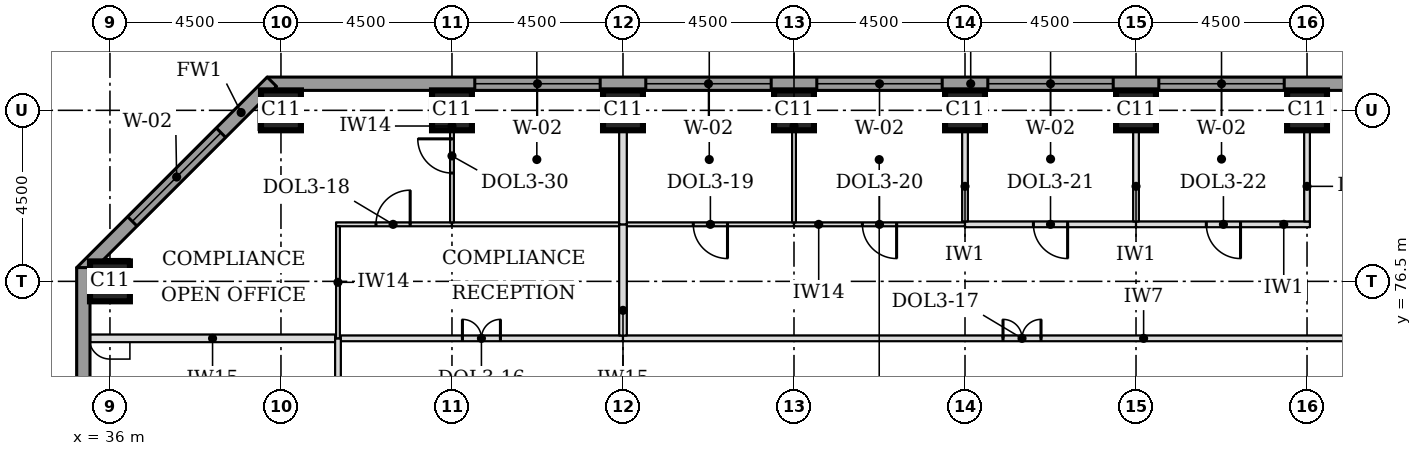
"""IFC4 building model, lengths in metres.
Left out: names, types, materials, properties, quantities, classifications, styles, units other than length and angle.
Written with IfcOpenShell. Run it as: python <this file> out.ifc"""

import sys

from ifc_helpers import new_model, si_unit, direction, frame, frame_2d, origin, origin_2d, place, context, subcontext, project, spatial, rectangle, extrude, element, fill, save


model = new_model("IFC4")
c1 = context("Model", 3, precision=1e-05, world=origin(), true_north=direction((0.0, 1.0)))
c2 = subcontext(c1, "Body", "Model", "MODEL_VIEW")
j1 = project(units=[si_unit("LENGTHUNIT", "METRE"), si_unit("PLANEANGLEUNIT", "RADIAN")], contexts=[c1])
p1 = place(None, origin())
s1 = spatial("IfcSite", under=j1, at=p1, CompositionType="ELEMENT")
p2 = place(p1, origin())
s2 = spatial("IfcBuilding", under=s1, at=p2, CompositionType="ELEMENT")
p3 = place(p2, frame((0.0, 0.0, 93.7)))
s3 = spatial("IfcBuildingStorey", under=s2, at=p3, CompositionType="ELEMENT", Elevation=93.7)
for number, where, z_axis, x_axis in (
    (1, (36.0, 76.5, 0.0), (0.0, 0.0, 1.0), (1.0, 0.0, 0.0)),
    (2, (40.5, 81.0, 0.0), (0.0, 0.0, 1.0), (1.0, 0.0, 0.0)),
    (3, (45.0, 81.0, 0.0), (0.0, 0.0, 1.0), (1.0, 0.0, 0.0)),
    (4, (49.5, 81.0, 0.0), (0.0, 0.0, 1.0), (1.0, 0.0, 0.0)),
    (5, (54.0, 81.0, 0.0), (0.0, 0.0, 1.0), (1.0, 0.0, 0.0)),
    (6, (58.5, 81.0, 0.0), (0.0, 0.0, 1.0), (1.0, 0.0, 0.0)),
    (7, (63.0, 81.0, 0.0), (0.0, 0.0, 1.0), (1.0, 0.0, 0.0)),
    (8, (67.5, 81.0, 0.0), (0.0, 0.0, 1.0), (1.0, 0.0, 0.0)),
):
    element("IfcColumn", number, at=place(p3, frame(where, z_axis=z_axis, x_axis=x_axis)), inside=s3, PredefinedType="COLUMN", context=c2, shape_type="SweptSolid", body=[
        extrude(rectangle(XDim=1.05, YDim=1.05, at=origin_2d()), origin(), (0.0, 0.0, 1.0), 3.7),
    ])
p4 = place(p3, frame((72.362, 81.7, 0.0), z_axis=(0.0, 0.0, 1.0), x_axis=(-1.0, 0.0, 0.0)))
e9 = element("IfcWall", 9, at=p4, inside=s3, PredefinedType="STANDARD", context=c2, shape_type="SweptSolid", body=[
    extrude(rectangle(XDim=32.225, YDim=0.35, at=frame_2d((16.112, 0.0))), origin(), (0.0, 0.0, 1.0), 3.525),
])
p5 = place(p4, frame((5.462, 0.0, 0.9)))
e10 = element("IfcOpeningElement", 10, at=p5, cuts=e9, PredefinedType="OPENING", context=c2, shape_type="SweptSolid", body=[
    extrude(rectangle(XDim=3.3, YDim=1.9, at=frame_2d((1.65, 0.95))), frame((0.0, 0.185, 0.0), z_axis=(0.0, -1.0, 0.0), x_axis=(1.0, 0.0, 0.0)), (0.0, 0.0, 1.0), 0.37),
])
p6 = place(p4, frame((9.962, 0.0, 0.9)))
e11 = element("IfcOpeningElement", 11, at=p6, cuts=e9, PredefinedType="OPENING", context=c2, shape_type="SweptSolid", body=[
    extrude(rectangle(XDim=3.3, YDim=1.9, at=frame_2d((1.65, 0.95))), frame((0.0, 0.185, 0.0), z_axis=(0.0, -1.0, 0.0), x_axis=(1.0, 0.0, 0.0)), (0.0, 0.0, 1.0), 0.37),
])
p7 = place(p4, frame((14.462, 0.0, 0.9)))
e12 = element("IfcOpeningElement", 12, at=p7, cuts=e9, PredefinedType="OPENING", context=c2, shape_type="SweptSolid", body=[
    extrude(rectangle(XDim=3.3, YDim=1.9, at=frame_2d((1.65, 0.95))), frame((0.0, 0.185, 0.0), z_axis=(0.0, -1.0, 0.0), x_axis=(1.0, 0.0, 0.0)), (0.0, 0.0, 1.0), 0.37),
])
p8 = place(p4, frame((18.962, 0.0, 0.9)))
e13 = element("IfcOpeningElement", 13, at=p8, cuts=e9, PredefinedType="OPENING", context=c2, shape_type="SweptSolid", body=[
    extrude(rectangle(XDim=3.3, YDim=1.9, at=frame_2d((1.65, 0.95))), frame((0.0, 0.185, 0.0), z_axis=(0.0, -1.0, 0.0), x_axis=(1.0, 0.0, 0.0)), (0.0, 0.0, 1.0), 0.37),
])
p9 = place(p4, frame((23.462, 0.0, 0.9)))
e14 = element("IfcOpeningElement", 14, at=p9, cuts=e9, PredefinedType="OPENING", context=c2, shape_type="SweptSolid", body=[
    extrude(rectangle(XDim=3.3, YDim=1.9, at=frame_2d((1.65, 0.95))), frame((0.0, 0.185, 0.0), z_axis=(0.0, -1.0, 0.0), x_axis=(1.0, 0.0, 0.0)), (0.0, 0.0, 1.0), 0.37),
])
p10 = place(p3, frame((40.261, 81.751, 0.0), z_axis=(0.0, 0.0, 1.0), x_axis=(-0.707106781187, -0.707106781187, 0.0)))
e15 = element("IfcWall", 15, at=p10, inside=s3, PredefinedType="STANDARD", context=c2, shape_type="SweptSolid", body=[
    extrude(rectangle(XDim=7.089, YDim=0.35, at=frame_2d((3.544, 0.0))), origin(), (0.0, 0.0, 1.0), 3.525),
])
p11 = place(p10, frame((1.894, 0.0, 0.9)))
e16 = element("IfcOpeningElement", 16, at=p11, cuts=e15, PredefinedType="OPENING", context=c2, shape_type="SweptSolid", body=[
    extrude(rectangle(XDim=3.3, YDim=1.9, at=frame_2d((1.65, 0.95))), frame((0.0, 0.185, 0.0), z_axis=(0.0, -1.0, 0.0), x_axis=(1.0, 0.0, 0.0)), (0.0, 0.0, 1.0), 0.37),
])
p12 = place(p3, frame((35.3, 76.862, 0.0), z_axis=(0.0, 0.0, 1.0), x_axis=(0.0, -1.0, 0.0)))
e17 = element("IfcWall", 17, at=p12, inside=s3, PredefinedType="STANDARD", context=c2, shape_type="SweptSolid", body=[
    extrude(rectangle(XDim=13.337, YDim=0.35, at=frame_2d((6.669, 0.0))), origin(), (0.0, 0.0, 1.0), 3.525),
])
p13 = place(p12, frame((9.537, 0.0, 0.9)))
e18 = element("IfcOpeningElement", 18, at=p13, cuts=e17, PredefinedType="OPENING", context=c2, shape_type="SweptSolid", body=[
    extrude(rectangle(XDim=3.3, YDim=1.9, at=frame_2d((1.65, 0.95))), frame((0.0, 0.185, 0.0), z_axis=(0.0, -1.0, 0.0), x_axis=(1.0, 0.0, 0.0)), (0.0, 0.0, 1.0), 0.37),
])
p14 = place(p3, frame((35.475, 75.0, 0.0), z_axis=(0.0, 0.0, 1.0), x_axis=(1.0, 0.0, 0.0)))
e19 = element("IfcWall", 19, at=p14, inside=s3, PredefinedType="PARTITIONING", context=c2, shape_type="SweptSolid", body=[
    extrude(rectangle(XDim=6.45, YDim=0.2, at=frame_2d((3.225, 0.0))), origin(), (0.0, 0.0, 1.0), 3.55),
])
p15 = place(p3, frame((42.075, 75.0, 0.0), z_axis=(0.0, 0.0, 1.0), x_axis=(1.0, 0.0, 0.0)))
e20 = element("IfcWall", 20, at=p15, inside=s3, PredefinedType="PARTITIONING", context=c2, shape_type="SweptSolid", body=[
    extrude(rectangle(XDim=7.425, YDim=0.15, at=frame_2d((3.712, 0.0))), origin(), (0.0, 0.0, 1.0), 3.55),
])
p16 = place(p15, frame((3.2, 0.0, 0.0)))
e21 = element("IfcOpeningElement", 21, at=p16, cuts=e20, PredefinedType="OPENING", context=c2, shape_type="SweptSolid", body=[
    extrude(rectangle(XDim=1.0, YDim=2.1, at=frame_2d((0.5, 1.05))), frame((0.0, 0.085, 0.0), z_axis=(0.0, -1.0, 0.0), x_axis=(1.0, 0.0, 0.0)), (0.0, 0.0, 1.0), 0.17),
])
p17 = place(p3, frame((49.5, 75.0, 0.0), z_axis=(0.0, 0.0, 1.0), x_axis=(1.0, 0.0, 0.0)))
e22 = element("IfcWall", 22, at=p17, inside=s3, PredefinedType="PARTITIONING", context=c2, shape_type="SweptSolid", body=[
    extrude(rectangle(XDim=21.0, YDim=0.15, at=frame_2d((10.5, 0.0))), origin(), (0.0, 0.0, 1.0), 3.55),
])
p18 = place(p17, frame((10.0, 0.0, 0.0)))
e23 = element("IfcOpeningElement", 23, at=p18, cuts=e22, PredefinedType="OPENING", context=c2, shape_type="SweptSolid", body=[
    extrude(rectangle(XDim=1.0, YDim=2.1, at=frame_2d((0.5, 1.05))), frame((0.0, 0.085, 0.0), z_axis=(0.0, -1.0, 0.0), x_axis=(1.0, 0.0, 0.0)), (0.0, 0.0, 1.0), 0.17),
])
p19 = place(p3, frame((41.95, 78.0, 0.0), z_axis=(0.0, 0.0, 1.0), x_axis=(1.0, 0.0, 0.0)))
e24 = element("IfcWall", 24, at=p19, inside=s3, PredefinedType="PARTITIONING", context=c2, shape_type="SweptSolid", body=[
    extrude(rectangle(XDim=3.05, YDim=0.1, at=frame_2d((1.525, 0.0))), origin(), (0.0, 0.0, 1.0), 3.55),
])
p20 = place(p19, frame((1.05, 0.0, 0.0)))
e25 = element("IfcOpeningElement", 25, at=p20, cuts=e24, PredefinedType="OPENING", context=c2, shape_type="SweptSolid", body=[
    extrude(rectangle(XDim=0.9, YDim=2.1, at=frame_2d((0.45, 1.05))), frame((0.0, 0.06, 0.0), z_axis=(0.0, -1.0, 0.0), x_axis=(1.0, 0.0, 0.0)), (0.0, 0.0, 1.0), 0.12),
])
p21 = place(p3, frame((45.0, 78.0, 0.0), z_axis=(0.0, 0.0, 1.0), x_axis=(1.0, 0.0, 0.0)))
e26 = element("IfcWall", 26, at=p21, inside=s3, PredefinedType="PARTITIONING", context=c2, shape_type="SweptSolid", body=[
    extrude(rectangle(XDim=4.4, YDim=0.1, at=frame_2d((2.2, 0.0))), origin(), (0.0, 0.0, 1.0), 3.55),
])
p22 = place(p3, frame((49.6, 78.0, 0.0), z_axis=(0.0, 0.0, 1.0), x_axis=(1.0, 0.0, 0.0)))
e27 = element("IfcWall", 27, at=p22, inside=s3, PredefinedType="PARTITIONING", context=c2, shape_type="SweptSolid", body=[
    extrude(rectangle(XDim=4.4, YDim=0.1, at=frame_2d((2.2, 0.0))), origin(), (0.0, 0.0, 1.0), 3.55),
])
p23 = place(p22, frame((1.75, 0.0, 0.0)))
e28 = element("IfcOpeningElement", 28, at=p23, cuts=e27, PredefinedType="OPENING", context=c2, shape_type="SweptSolid", body=[
    extrude(rectangle(XDim=0.9, YDim=2.1, at=frame_2d((0.45, 1.05))), frame((0.0, 0.06, 0.0), z_axis=(0.0, -1.0, 0.0), x_axis=(1.0, 0.0, 0.0)), (0.0, 0.0, 1.0), 0.12),
])
p24 = place(p3, frame((54.0, 78.0, 0.0), z_axis=(0.0, 0.0, 1.0), x_axis=(1.0, 0.0, 0.0)))
e29 = element("IfcWall", 29, at=p24, inside=s3, PredefinedType="PARTITIONING", context=c2, shape_type="SweptSolid", body=[
    extrude(rectangle(XDim=4.5, YDim=0.1, at=frame_2d((2.25, 0.0))), origin(), (0.0, 0.0, 1.0), 3.55),
])
p25 = place(p24, frame((1.8, 0.0, 0.0)))
e30 = element("IfcOpeningElement", 30, at=p25, cuts=e29, PredefinedType="OPENING", context=c2, shape_type="SweptSolid", body=[
    extrude(rectangle(XDim=0.9, YDim=2.1, at=frame_2d((0.45, 1.05))), frame((0.0, 0.06, 0.0), z_axis=(0.0, -1.0, 0.0), x_axis=(1.0, 0.0, 0.0)), (0.0, 0.0, 1.0), 0.12),
])
p26 = place(p3, frame((58.5, 78.0, 0.0), z_axis=(0.0, 0.0, 1.0), x_axis=(1.0, 0.0, 0.0)))
e31 = element("IfcWall", 31, at=p26, inside=s3, PredefinedType="PARTITIONING", context=c2, shape_type="SweptSolid", body=[
    extrude(rectangle(XDim=4.5, YDim=0.15, at=frame_2d((2.25, 0.0))), origin(), (0.0, 0.0, 1.0), 3.55),
])
p27 = place(p26, frame((1.8, 0.0, 0.0)))
e32 = element("IfcOpeningElement", 32, at=p27, cuts=e31, PredefinedType="OPENING", context=c2, shape_type="SweptSolid", body=[
    extrude(rectangle(XDim=0.9, YDim=2.1, at=frame_2d((0.45, 1.05))), frame((0.0, 0.085, 0.0), z_axis=(0.0, -1.0, 0.0), x_axis=(1.0, 0.0, 0.0)), (0.0, 0.0, 1.0), 0.17),
])
p28 = place(p3, frame((63.0, 78.0, 0.0), z_axis=(0.0, 0.0, 1.0), x_axis=(1.0, 0.0, 0.0)))
e33 = element("IfcWall", 33, at=p28, inside=s3, PredefinedType="PARTITIONING", context=c2, shape_type="SweptSolid", body=[
    extrude(rectangle(XDim=4.575, YDim=0.15, at=frame_2d((2.288, 0.0))), origin(), (0.0, 0.0, 1.0), 3.55),
])
p29 = place(p28, frame((1.85, 0.0, 0.0)))
e34 = element("IfcOpeningElement", 34, at=p29, cuts=e33, PredefinedType="OPENING", context=c2, shape_type="SweptSolid", body=[
    extrude(rectangle(XDim=0.9, YDim=2.1, at=frame_2d((0.45, 1.05))), frame((0.0, 0.085, 0.0), z_axis=(0.0, -1.0, 0.0), x_axis=(1.0, 0.0, 0.0)), (0.0, 0.0, 1.0), 0.17),
])
p30 = place(p3, frame((42.0, 57.075, 0.0), z_axis=(0.0, 0.0, 1.0), x_axis=(0.0, 1.0, 0.0)))
e35 = element("IfcWall", 35, at=p30, inside=s3, PredefinedType="PARTITIONING", context=c2, shape_type="SweptSolid", body=[
    extrude(rectangle(XDim=17.925, YDim=0.15, at=frame_2d((8.962, 0.0))), origin(), (0.0, 0.0, 1.0), 3.55),
])
p31 = place(p3, frame((42.0, 75.0, 0.0), z_axis=(0.0, 0.0, 1.0), x_axis=(0.0, 1.0, 0.0)))
e36 = element("IfcWall", 36, at=p31, inside=s3, PredefinedType="PARTITIONING", context=c2, shape_type="SweptSolid", body=[
    extrude(rectangle(XDim=2.95, YDim=0.1, at=frame_2d((1.475, 0.0))), origin(), (0.0, 0.0, 1.0), 3.55),
])
p32 = place(p3, frame((49.5, 75.075, 0.0), z_axis=(0.0, 0.0, 1.0), x_axis=(0.0, 1.0, 0.0)))
e37 = element("IfcWall", 37, at=p32, inside=s3, PredefinedType="PARTITIONING", context=c2, shape_type="SweptSolid", body=[
    extrude(rectangle(XDim=2.925, YDim=0.2, at=frame_2d((1.462, 0.0))), origin(), (0.0, 0.0, 1.0), 3.55),
])
p33 = place(p3, frame((49.5, 78.0, 0.0), z_axis=(0.0, 0.0, 1.0), x_axis=(0.0, 1.0, 0.0)))
e38 = element("IfcWall", 38, at=p33, inside=s3, PredefinedType="PARTITIONING", context=c2, shape_type="SweptSolid", body=[
    extrude(rectangle(XDim=3.525, YDim=0.2, at=frame_2d((1.762, 0.0))), origin(), (0.0, 0.0, 1.0), 3.55),
])
p34 = place(p3, frame((45.0, 78.05, 0.0), z_axis=(0.0, 0.0, 1.0), x_axis=(0.0, 1.0, 0.0)))
e39 = element("IfcWall", 39, at=p34, inside=s3, PredefinedType="PARTITIONING", context=c2, shape_type="SweptSolid", body=[
    extrude(rectangle(XDim=3.475, YDim=0.1, at=frame_2d((1.737, 0.0))), origin(), (0.0, 0.0, 1.0), 3.55),
])
p35 = place(p34, frame((1.3, 0.0, 0.0)))
e40 = element("IfcOpeningElement", 40, at=p35, cuts=e39, PredefinedType="OPENING", context=c2, shape_type="SweptSolid", body=[
    extrude(rectangle(XDim=0.9, YDim=2.1, at=frame_2d((0.45, 1.05))), frame((0.0, 0.06, 0.0), z_axis=(0.0, -1.0, 0.0), x_axis=(1.0, 0.0, 0.0)), (0.0, 0.0, 1.0), 0.12),
])
p36 = place(p3, frame((54.0, 78.05, 0.0), z_axis=(0.0, 0.0, 1.0), x_axis=(0.0, 1.0, 0.0)))
e41 = element("IfcWall", 41, at=p36, inside=s3, PredefinedType="PARTITIONING", context=c2, shape_type="SweptSolid", body=[
    extrude(rectangle(XDim=3.475, YDim=0.1, at=frame_2d((1.737, 0.0))), origin(), (0.0, 0.0, 1.0), 3.55),
])
for number, where, z_axis, x_axis in (
    (42, (58.5, 78.075, 0.0), (0.0, 0.0, 1.0), (0.0, 1.0, 0.0)),
    (43, (63.0, 78.075, 0.0), (0.0, 0.0, 1.0), (0.0, 1.0, 0.0)),
    (44, (67.5, 78.075, 0.0), (0.0, 0.0, 1.0), (0.0, 1.0, 0.0)),
):
    element("IfcWall", number, at=place(p3, frame(where, z_axis=z_axis, x_axis=x_axis)), inside=s3, PredefinedType="PARTITIONING", context=c2, shape_type="SweptSolid", body=[
        extrude(rectangle(XDim=3.45, YDim=0.15, at=frame_2d((1.725, 0.0))), origin(), (0.0, 0.0, 1.0), 3.55),
    ])
p37 = place(p5, origin())
e45 = element("IfcWindow", 45, at=p37, inside=s3, PartitioningType="SINGLE_PANEL", PredefinedType="WINDOW", context=c2, shape_type="SweptSolid", body=[
    extrude(rectangle(XDim=3.3, YDim=1.9, at=frame_2d((1.65, 0.95))), frame((0.0, 0.085, 0.0), z_axis=(0.0, -1.0, 0.0), x_axis=(1.0, 0.0, 0.0)), (0.0, 0.0, 1.0), 0.06),
])
fill(e10, e45)
p38 = place(p6, origin())
e46 = element("IfcWindow", 46, at=p38, inside=s3, PartitioningType="SINGLE_PANEL", PredefinedType="WINDOW", context=c2, shape_type="SweptSolid", body=[
    extrude(rectangle(XDim=3.3, YDim=1.9, at=frame_2d((1.65, 0.95))), frame((0.0, 0.085, 0.0), z_axis=(0.0, -1.0, 0.0), x_axis=(1.0, 0.0, 0.0)), (0.0, 0.0, 1.0), 0.06),
])
fill(e11, e46)
p39 = place(p7, origin())
e47 = element("IfcWindow", 47, at=p39, inside=s3, PartitioningType="SINGLE_PANEL", PredefinedType="WINDOW", context=c2, shape_type="SweptSolid", body=[
    extrude(rectangle(XDim=3.3, YDim=1.9, at=frame_2d((1.65, 0.95))), frame((0.0, 0.085, 0.0), z_axis=(0.0, -1.0, 0.0), x_axis=(1.0, 0.0, 0.0)), (0.0, 0.0, 1.0), 0.06),
])
fill(e12, e47)
p40 = place(p8, origin())
e48 = element("IfcWindow", 48, at=p40, inside=s3, PartitioningType="SINGLE_PANEL", PredefinedType="WINDOW", context=c2, shape_type="SweptSolid", body=[
    extrude(rectangle(XDim=3.3, YDim=1.9, at=frame_2d((1.65, 0.95))), frame((0.0, 0.085, 0.0), z_axis=(0.0, -1.0, 0.0), x_axis=(1.0, 0.0, 0.0)), (0.0, 0.0, 1.0), 0.06),
])
fill(e13, e48)
p41 = place(p9, origin())
e49 = element("IfcWindow", 49, at=p41, inside=s3, PartitioningType="SINGLE_PANEL", PredefinedType="WINDOW", context=c2, shape_type="SweptSolid", body=[
    extrude(rectangle(XDim=3.3, YDim=1.9, at=frame_2d((1.65, 0.95))), frame((0.0, 0.085, 0.0), z_axis=(0.0, -1.0, 0.0), x_axis=(1.0, 0.0, 0.0)), (0.0, 0.0, 1.0), 0.06),
])
fill(e14, e49)
p42 = place(p11, origin())
e50 = element("IfcWindow", 50, at=p42, inside=s3, PartitioningType="SINGLE_PANEL", PredefinedType="WINDOW", context=c2, shape_type="SweptSolid", body=[
    extrude(rectangle(XDim=3.3, YDim=1.9, at=frame_2d((1.65, 0.95))), frame((0.0, 0.085, 0.0), z_axis=(0.0, -1.0, 0.0), x_axis=(1.0, 0.0, 0.0)), (0.0, 0.0, 1.0), 0.06),
])
fill(e16, e50)
p43 = place(p16, origin())
e51 = element("IfcDoor", 51, at=p43, inside=s3, OperationType="DOUBLE_DOOR_SINGLE_SWING", PredefinedType="DOOR", context=c2, shape_type="SweptSolid", body=[
    extrude(rectangle(XDim=1.0, YDim=2.1, at=frame_2d((0.5, 1.05))), frame((0.0, 0.025, 0.0), z_axis=(0.0, -1.0, 0.0), x_axis=(1.0, 0.0, 0.0)), (0.0, 0.0, 1.0), 0.05),
])
fill(e21, e51)
p44 = place(p20, origin())
e52 = element("IfcDoor", 52, at=p44, inside=s3, OperationType="SINGLE_SWING_RIGHT", PredefinedType="DOOR", context=c2, shape_type="SweptSolid", body=[
    extrude(rectangle(XDim=0.9, YDim=2.1, at=frame_2d((0.45, 1.05))), frame((0.0, 0.025, 0.0), z_axis=(0.0, -1.0, 0.0), x_axis=(1.0, 0.0, 0.0)), (0.0, 0.0, 1.0), 0.05),
])
fill(e25, e52)
p45 = place(p35, origin())
e53 = element("IfcDoor", 53, at=p45, inside=s3, OperationType="SINGLE_SWING_RIGHT", PredefinedType="DOOR", context=c2, shape_type="SweptSolid", body=[
    extrude(rectangle(XDim=0.9, YDim=2.1, at=frame_2d((0.45, 1.05))), frame((0.0, 0.025, 0.0), z_axis=(0.0, -1.0, 0.0), x_axis=(1.0, 0.0, 0.0)), (0.0, 0.0, 1.0), 0.05),
])
fill(e40, e53)
p46 = place(p18, origin())
e54 = element("IfcDoor", 54, at=p46, inside=s3, OperationType="DOUBLE_DOOR_SINGLE_SWING", PredefinedType="DOOR", context=c2, shape_type="SweptSolid", body=[
    extrude(rectangle(XDim=1.0, YDim=2.1, at=frame_2d((0.5, 1.05))), frame((0.0, 0.025, 0.0), z_axis=(0.0, -1.0, 0.0), x_axis=(1.0, 0.0, 0.0)), (0.0, 0.0, 1.0), 0.05),
])
fill(e23, e54)
p47 = place(p23, frame((0.9, 0.0, 0.0), z_axis=(0.0, 0.0, 1.0), x_axis=(-1.0, 0.0, 0.0)))
e55 = element("IfcDoor", 55, at=p47, inside=s3, OperationType="SINGLE_SWING_LEFT", PredefinedType="DOOR", context=c2, shape_type="SweptSolid", body=[
    extrude(rectangle(XDim=0.9, YDim=2.1, at=frame_2d((0.45, 1.05))), frame((0.0, 0.025, 0.0), z_axis=(0.0, -1.0, 0.0), x_axis=(1.0, 0.0, 0.0)), (0.0, 0.0, 1.0), 0.05),
])
fill(e28, e55)
p48 = place(p25, frame((0.9, 0.0, 0.0), z_axis=(0.0, 0.0, 1.0), x_axis=(-1.0, 0.0, 0.0)))
e56 = element("IfcDoor", 56, at=p48, inside=s3, OperationType="SINGLE_SWING_LEFT", PredefinedType="DOOR", context=c2, shape_type="SweptSolid", body=[
    extrude(rectangle(XDim=0.9, YDim=2.1, at=frame_2d((0.45, 1.05))), frame((0.0, 0.025, 0.0), z_axis=(0.0, -1.0, 0.0), x_axis=(1.0, 0.0, 0.0)), (0.0, 0.0, 1.0), 0.05),
])
fill(e30, e56)
p49 = place(p27, frame((0.9, 0.0, 0.0), z_axis=(0.0, 0.0, 1.0), x_axis=(-1.0, 0.0, 0.0)))
e57 = element("IfcDoor", 57, at=p49, inside=s3, OperationType="SINGLE_SWING_LEFT", PredefinedType="DOOR", context=c2, shape_type="SweptSolid", body=[
    extrude(rectangle(XDim=0.9, YDim=2.1, at=frame_2d((0.45, 1.05))), frame((0.0, 0.025, 0.0), z_axis=(0.0, -1.0, 0.0), x_axis=(1.0, 0.0, 0.0)), (0.0, 0.0, 1.0), 0.05),
])
fill(e32, e57)
p50 = place(p29, frame((0.9, 0.0, 0.0), z_axis=(0.0, 0.0, 1.0), x_axis=(-1.0, 0.0, 0.0)))
e58 = element("IfcDoor", 58, at=p50, inside=s3, OperationType="SINGLE_SWING_LEFT", PredefinedType="DOOR", context=c2, shape_type="SweptSolid", body=[
    extrude(rectangle(XDim=0.9, YDim=2.1, at=frame_2d((0.45, 1.05))), frame((0.0, 0.025, 0.0), z_axis=(0.0, -1.0, 0.0), x_axis=(1.0, 0.0, 0.0)), (0.0, 0.0, 1.0), 0.05),
])
fill(e34, e58)
save(model, sys.argv[1])
